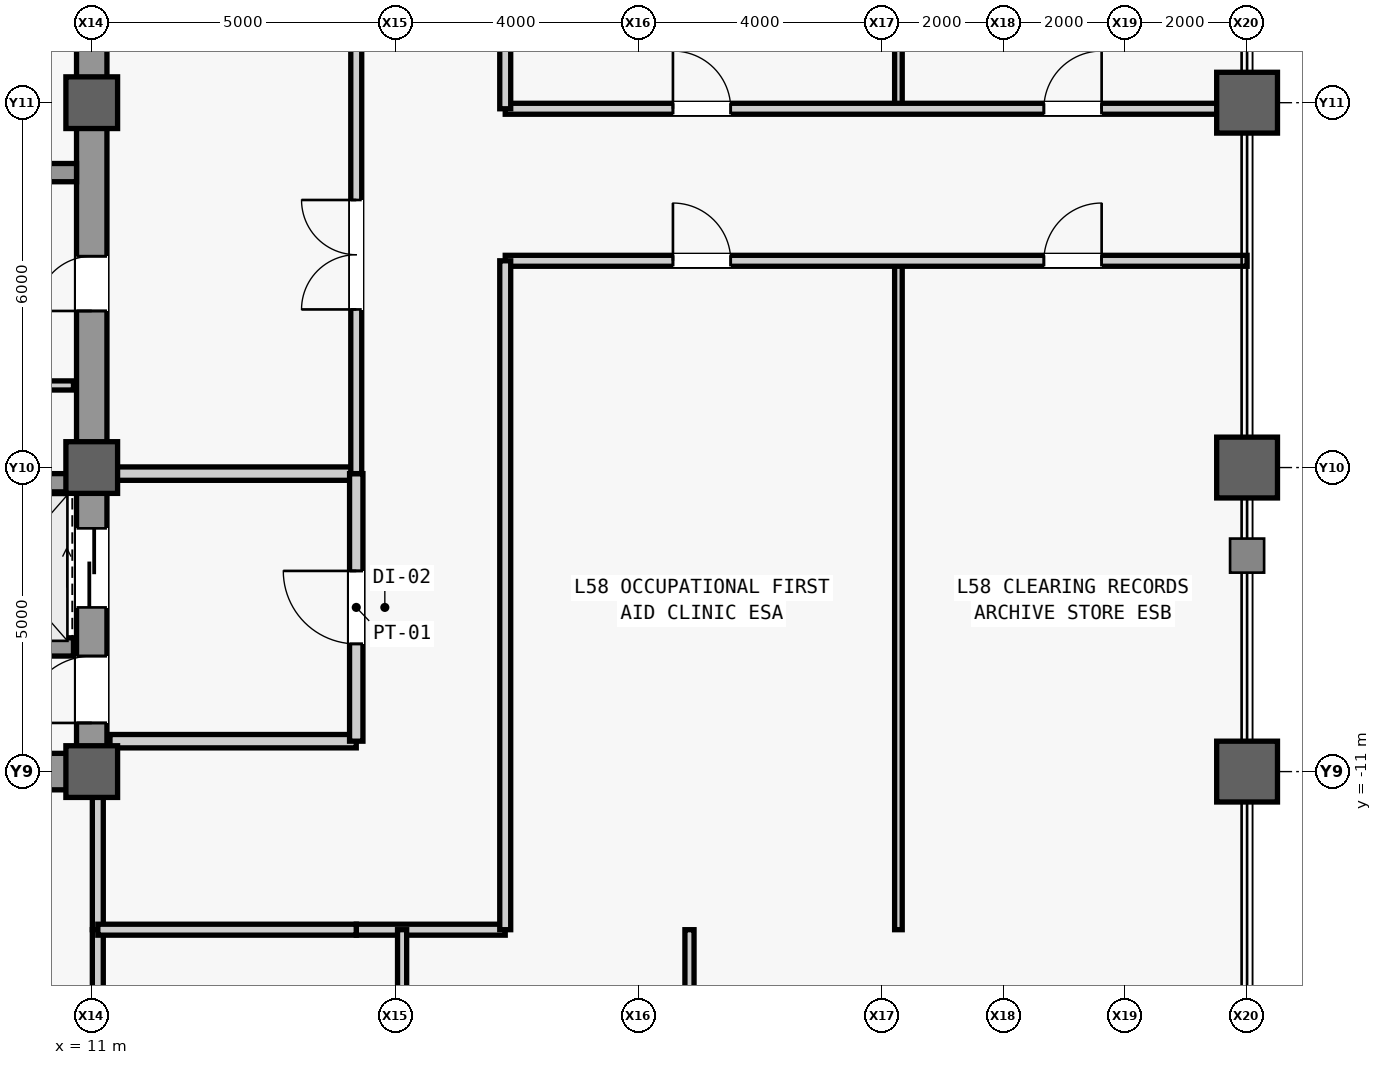
"""IFC4 building model, lengths in metres.
Left out: names, types, materials, properties, quantities, classifications, styles, units other than length and angle.
Written with IfcOpenShell. Run it as: python <this file> out.ifc"""

import sys

from ifc_helpers import new_model, si_unit, direction, frame, frame_2d, origin, origin_2d, place, context, subcontext, project, spatial, rectangle, hollow_rectangle, extrude, source, transform, mapped, element, fill, save


model = new_model("IFC4")
c1 = context("Model", 3, precision=1e-05, world=origin(), true_north=direction((0.0, 1.0)))
c2 = subcontext(c1, "Body", "Model", "MODEL_VIEW")
j1 = project(units=[si_unit("LENGTHUNIT", "METRE"), si_unit("PLANEANGLEUNIT", "RADIAN")], contexts=[c1])
p1 = place(None, origin())
s1 = spatial("IfcSite", under=j1, at=p1, CompositionType="ELEMENT")
p2 = place(p1, origin())
s2 = spatial("IfcBuilding", under=s1, at=p2, CompositionType="ELEMENT")
p3 = place(p2, frame((0.0, 0.0, 247.1)))
s3 = spatial("IfcBuildingStorey", under=s2, at=p3, CompositionType="ELEMENT", Elevation=247.1)
m1 = source(origin(), c2, "Body", "SweptSolid", [
    extrude(rectangle(XDim=22.0, YDim=0.5, at=frame_2d((11.0, 0.0))), origin(), (0.0, 0.0, 1.0), 3.78),
])
p4 = place(p3, frame((11.0, -11.0, 0.0), z_axis=(0.0, 0.0, 1.0), x_axis=(0.0, 1.0, 0.0)))
e1 = element("IfcWall", 1, at=p4, inside=s3, PredefinedType="SHEAR", context=c2, shape_type="MappedRepresentation", body=[
    mapped(m1, transform((0.0, 0.0, 0.0), scale=1.0)),
])
m2 = source(origin(), c2, "Body", "SweptSolid", [
    extrude(rectangle(XDim=1.1, YDim=2.2, at=frame_2d((0.55, 1.1))), frame((0.0, 0.26, 0.0), z_axis=(0.0, -1.0, 0.0), x_axis=(1.0, 0.0, 0.0)), (0.0, 0.0, 1.0), 0.52),
])
p5 = place(p4, frame((0.8, 0.0, 0.0)))
e2 = element("IfcOpeningElement", 2, at=p5, cuts=e1, PredefinedType="OPENING", context=c2, shape_type="MappedRepresentation", body=[
    mapped(m2, transform((0.0, 0.0, 0.0), scale=1.0)),
])
m3 = source(origin(), c2, "Body", "SweptSolid", [
    extrude(rectangle(XDim=0.9, YDim=2.15, at=frame_2d((0.45, 1.075))), frame((0.0, 0.26, 0.0), z_axis=(0.0, -1.0, 0.0), x_axis=(1.0, 0.0, 0.0)), (0.0, 0.0, 1.0), 0.52),
])
p6 = place(p4, frame((7.575, 0.0, 0.0)))
e3 = element("IfcOpeningElement", 3, at=p6, cuts=e1, PredefinedType="OPENING", context=c2, shape_type="MappedRepresentation", body=[
    mapped(m3, transform((0.0, 0.0, 0.0), scale=1.0)),
])
m4 = source(origin(), c2, "Body", "SweptSolid", [
    extrude(rectangle(XDim=1.3, YDim=2.3, at=frame_2d((0.65, 1.15))), frame((0.0, 0.26, 0.0), z_axis=(0.0, -1.0, 0.0), x_axis=(1.0, 0.0, 0.0)), (0.0, 0.0, 1.0), 0.52),
])
p7 = place(p4, frame((2.7, 0.0, 0.0)))
e4 = element("IfcOpeningElement", 4, at=p7, cuts=e1, PredefinedType="OPENING", context=c2, shape_type="MappedRepresentation", body=[
    mapped(m4, transform((0.0, 0.0, 0.0), scale=1.0)),
])
p8 = place(p4, frame((13.35, 0.0, 0.0)))
e5 = element("IfcOpeningElement", 5, at=p8, cuts=e1, PredefinedType="OPENING", context=c2, shape_type="MappedRepresentation", body=[
    mapped(m4, transform((0.0, 0.0, 0.0), scale=1.0)),
])
m5 = source(origin(), c2, "Body", "SweptSolid", [
    extrude(rectangle(XDim=5.9, YDim=0.6, at=frame_2d((2.95, 0.0))), origin(), (0.0, 0.0, 1.0), 3.78),
])
p9 = place(p3, frame((4.85, -11.0, 0.0), z_axis=(0.0, 0.0, 1.0), x_axis=(1.0, 0.0, 0.0)))
e6 = element("IfcWall", 6, at=p9, inside=s3, PredefinedType="SHEAR", context=c2, shape_type="MappedRepresentation", body=[
    mapped(m5, transform((0.0, 0.0, 0.0), scale=1.0)),
])
m6 = source(origin(), c2, "Body", "SweptSolid", [
    extrude(rectangle(XDim=5.65, YDim=0.3, at=frame_2d((2.825, 0.0))), origin(), (0.0, 0.0, 1.0), 3.78),
])
p10 = place(p3, frame((5.1, -1.15, 0.0), z_axis=(0.0, 0.0, 1.0), x_axis=(1.0, 0.0, 0.0)))
e7 = element("IfcWall", 7, at=p10, inside=s3, PredefinedType="SHEAR", context=c2, shape_type="MappedRepresentation", body=[
    mapped(m6, transform((0.0, 0.0, 0.0), scale=1.0)),
])
m7 = source(origin(), c2, "Body", "SweptSolid", [
    extrude(rectangle(XDim=0.85, YDim=0.85, at=origin_2d()), origin(), (0.0, 0.0, 1.0), 4.0),
])
for number, where, z_axis, x_axis in (
    (8, (11.0, -11.0, 0.0), (0.0, 0.0, 1.0), (1.0, 0.0, 0.0)),
    (9, (11.0, -6.0, 0.0), (0.0, 0.0, 1.0), (1.0, 0.0, 0.0)),
    (10, (11.0, 0.0, 0.0), (0.0, 0.0, 1.0), (1.0, 0.0, 0.0)),
):
    element("IfcColumn", number, at=place(p3, frame(where, z_axis=z_axis, x_axis=x_axis)), inside=s3, PredefinedType="COLUMN", context=c2, shape_type="MappedRepresentation", body=[
        mapped(m7, transform((0.0, 0.0, 0.0), scale=1.0)),
    ])
m8 = source(origin(), c2, "Body", "SweptSolid", [
    extrude(hollow_rectangle(XDim=1.0, YDim=1.0, WallThickness=0.055, at=origin_2d()), origin(), (0.0, 0.0, 1.0), 4.0),
])
for number, where, z_axis, x_axis in (
    (11, (30.0, -11.0, 0.0), (0.0, 0.0, 1.0), (1.0, 0.0, 0.0)),
    (12, (30.0, -6.0, 0.0), (0.0, 0.0, 1.0), (1.0, 0.0, 0.0)),
    (13, (30.0, 0.0, 0.0), (0.0, 0.0, 1.0), (1.0, 0.0, 0.0)),
):
    element("IfcColumn", number, at=place(p3, frame(where, z_axis=z_axis, x_axis=x_axis)), inside=s3, PredefinedType="COLUMN", context=c2, shape_type="MappedRepresentation", body=[
        mapped(m8, transform((0.0, 0.0, 0.0), scale=1.0)),
    ])
m9 = source(origin(), c2, "Body", "SweptSolid", [
    extrude(rectangle(XDim=2.2, YDim=0.3, at=frame_2d((1.1, 0.0))), origin(), (0.0, 0.0, 1.0), 3.78),
])
for number, where, z_axis, x_axis in (
    (14, (8.5, -8.95, 0.0), (0.0, 0.0, 1.0), (1.0, 0.0, 0.0)),
    (15, (8.5, -6.25, 0.0), (0.0, 0.0, 1.0), (1.0, 0.0, 0.0)),
):
    element("IfcWall", number, at=place(p3, frame(where, z_axis=z_axis, x_axis=x_axis)), inside=s3, PredefinedType="SHEAR", context=c2, shape_type="MappedRepresentation", body=[
        mapped(m9, transform((0.0, 0.0, 0.0), scale=1.0)),
    ])
m10 = source(origin(), c2, "Body", "SweptSolid", [
    extrude(rectangle(XDim=2.05, YDim=0.15, at=frame_2d((1.025, 0.0))), origin(), (0.0, 0.0, 1.0), 3.78),
])
p11 = place(p3, frame((8.65, -4.65, 0.0), z_axis=(0.0, 0.0, 1.0), x_axis=(1.0, 0.0, 0.0)))
e16 = element("IfcWall", 16, at=p11, inside=s3, PredefinedType="PARTITIONING", context=c2, shape_type="MappedRepresentation", body=[
    mapped(m10, transform((0.0, 0.0, 0.0), scale=1.0)),
])
m11 = source(origin(), c2, "Body", "SweptSolid", [
    extrude(rectangle(XDim=4.05, YDim=0.22, at=frame_2d((2.025, 0.0))), origin(), (0.0, 0.0, 1.0), 3.78),
])
p12 = place(p3, frame((11.3, -10.5, 0.0), z_axis=(0.0, 0.0, 1.0), x_axis=(1.0, 0.0, 0.0)))
e17 = element("IfcWall", 17, at=p12, inside=s3, PredefinedType="PARTITIONING", context=c2, shape_type="MappedRepresentation", body=[
    mapped(m11, transform((0.0, 0.0, 0.0), scale=1.0)),
])
m12 = source(origin(), c2, "Body", "SweptSolid", [
    extrude(rectangle(XDim=4.05, YDim=0.22, at=frame_2d((2.025, 0.0))), origin(), (0.0, 0.0, 1.0), 3.085),
])
p13 = place(p3, frame((11.3, -6.1, 0.0), z_axis=(0.0, 0.0, 1.0), x_axis=(1.0, 0.0, 0.0)))
e18 = element("IfcWall", 18, at=p13, inside=s3, PredefinedType="PARTITIONING", context=c2, shape_type="MappedRepresentation", body=[
    mapped(m12, transform((0.0, 0.0, 0.0), scale=1.0)),
])
m13 = source(origin(), c2, "Body", "SweptSolid", [
    extrude(rectangle(XDim=4.4, YDim=0.22, at=frame_2d((2.2, 0.0))), origin(), (0.0, 0.0, 1.0), 3.78),
])
p14 = place(p3, frame((15.35, -10.5, 0.0), z_axis=(0.0, 0.0, 1.0), x_axis=(0.0, 1.0, 0.0)))
e19 = element("IfcWall", 19, at=p14, inside=s3, PredefinedType="PARTITIONING", context=c2, shape_type="MappedRepresentation", body=[
    mapped(m13, transform((0.0, 0.0, 0.0), scale=1.0)),
])
m14 = source(origin(), c2, "Body", "SweptSolid", [
    extrude(rectangle(XDim=1.2, YDim=2.2, at=frame_2d((0.6, 1.1))), frame((0.0, 0.12, 0.0), z_axis=(0.0, -1.0, 0.0), x_axis=(1.0, 0.0, 0.0)), (0.0, 0.0, 1.0), 0.24),
])
p15 = place(p14, frame((1.6, 0.0, 0.0)))
e20 = element("IfcOpeningElement", 20, at=p15, cuts=e19, PredefinedType="OPENING", context=c2, shape_type="MappedRepresentation", body=[
    mapped(m14, transform((0.0, 0.0, 0.0), scale=1.0)),
])
m15 = source(origin(), c2, "Body", "SweptSolid", [
    extrude(rectangle(XDim=16.6, YDim=0.18, at=frame_2d((8.3, 0.0))), origin(), (0.0, 0.0, 1.0), 3.78),
])
p16 = place(p3, frame((15.35, -6.1, 0.0), z_axis=(0.0, 0.0, 1.0), x_axis=(0.0, 1.0, 0.0)))
e21 = element("IfcWall", 21, at=p16, inside=s3, PredefinedType="PARTITIONING", context=c2, shape_type="MappedRepresentation", body=[
    mapped(m15, transform((0.0, 0.0, 0.0), scale=1.0)),
])
m16 = source(origin(), c2, "Body", "SweptSolid", [
    extrude(rectangle(XDim=1.8, YDim=2.25, at=frame_2d((0.9, 1.125))), frame((0.0, 0.1, 0.0), z_axis=(0.0, -1.0, 0.0), x_axis=(1.0, 0.0, 0.0)), (0.0, 0.0, 1.0), 0.2),
])
p17 = place(p16, frame((2.7, 0.0, 0.0)))
e22 = element("IfcOpeningElement", 22, at=p17, cuts=e21, PredefinedType="OPENING", context=c2, shape_type="MappedRepresentation", body=[
    mapped(m16, transform((0.0, 0.0, 0.0), scale=1.0)),
])
p18 = place(p16, frame((13.0, 0.0, 0.0)))
e23 = element("IfcOpeningElement", 23, at=p18, cuts=e21, PredefinedType="OPENING", context=c2, shape_type="MappedRepresentation", body=[
    mapped(m16, transform((0.0, 0.0, 0.0), scale=1.0)),
])
m17 = source(origin(), c2, "Body", "SweptSolid", [
    extrude(rectangle(XDim=2.45, YDim=0.18, at=frame_2d((1.225, 0.0))), origin(), (0.0, 0.0, 1.0), 3.78),
])
p19 = place(p3, frame((15.35, -13.6, 0.0), z_axis=(0.0, 0.0, 1.0), x_axis=(1.0, 0.0, 0.0)))
e24 = element("IfcWall", 24, at=p19, inside=s3, PredefinedType="PARTITIONING", context=c2, shape_type="MappedRepresentation", body=[
    mapped(m17, transform((0.0, 0.0, 0.0), scale=1.0)),
])
m18 = source(origin(), c2, "Body", "SweptSolid", [
    extrude(rectangle(XDim=2.6, YDim=0.18, at=frame_2d((1.3, 0.0))), origin(), (0.0, 0.0, 1.0), 3.085),
])
p20 = place(p3, frame((11.1, -13.6, 0.0), z_axis=(0.0, 0.0, 1.0), x_axis=(0.0, 1.0, 0.0)))
e25 = element("IfcWall", 25, at=p20, inside=s3, PredefinedType="PARTITIONING", context=c2, shape_type="MappedRepresentation", body=[
    mapped(m18, transform((0.0, 0.0, 0.0), scale=1.0)),
])
m19 = source(origin(), c2, "Body", "SweptSolid", [
    extrude(rectangle(XDim=16.4, YDim=0.15, at=frame_2d((8.2, 0.0))), origin(), (0.0, 0.0, 1.0), 3.78),
])
p21 = place(p3, frame((16.104, -30.0, 0.0), z_axis=(0.0, 0.0, 1.0), x_axis=(0.0, 1.0, 0.0)))
e26 = element("IfcWall", 26, at=p21, inside=s3, PredefinedType="PARTITIONING", context=c2, shape_type="MappedRepresentation", body=[
    mapped(m19, transform((0.0, 0.0, 0.0), scale=1.0)),
])
m20 = source(origin(), c2, "Body", "SweptSolid", [
    extrude(rectangle(XDim=0.95, YDim=2.15, at=frame_2d((0.475, 1.075))), frame((0.0, 0.085, 0.0), z_axis=(0.0, -1.0, 0.0), x_axis=(1.0, 0.0, 0.0)), (0.0, 0.0, 1.0), 0.17),
])
p22 = place(p21, frame((11.825, 0.0, 0.0)))
e27 = element("IfcOpeningElement", 27, at=p22, cuts=e26, PredefinedType="OPENING", context=c2, shape_type="MappedRepresentation", body=[
    mapped(m20, transform((0.0, 0.0, 0.0), scale=1.0)),
])
p23 = place(p3, frame((20.83, -30.0, 0.0), z_axis=(0.0, 0.0, 1.0), x_axis=(0.0, 1.0, 0.0)))
e28 = element("IfcWall", 28, at=p23, inside=s3, PredefinedType="PARTITIONING", context=c2, shape_type="MappedRepresentation", body=[
    mapped(m19, transform((0.0, 0.0, 0.0), scale=1.0)),
])
p24 = place(p23, frame((11.825, 0.0, 0.0)))
e29 = element("IfcOpeningElement", 29, at=p24, cuts=e28, PredefinedType="OPENING", context=c2, shape_type="MappedRepresentation", body=[
    mapped(m20, transform((0.0, 0.0, 0.0), scale=1.0)),
])
m21 = source(origin(), c2, "Body", "SweptSolid", [
    extrude(rectangle(XDim=16.4, YDim=0.18, at=frame_2d((8.2, 0.0))), origin(), (0.0, 0.0, 1.0), 3.085),
])
p25 = place(p3, frame((11.1, -30.0, 0.0), z_axis=(0.0, 0.0, 1.0), x_axis=(0.0, 1.0, 0.0)))
e30 = element("IfcWall", 30, at=p25, inside=s3, PredefinedType="PARTITIONING", context=c2, shape_type="MappedRepresentation", body=[
    mapped(m21, transform((0.0, 0.0, 0.0), scale=1.0)),
])
m22 = source(origin(), c2, "Body", "SweptSolid", [
    extrude(rectangle(XDim=1.05, YDim=2.2, at=frame_2d((0.525, 1.1))), frame((0.0, 0.1, 0.0), z_axis=(0.0, -1.0, 0.0), x_axis=(1.0, 0.0, 0.0)), (0.0, 0.0, 1.0), 0.2),
])
p26 = place(p25, frame((3.575, 0.0, 0.0)))
e31 = element("IfcOpeningElement", 31, at=p26, cuts=e30, PredefinedType="OPENING", context=c2, shape_type="MappedRepresentation", body=[
    mapped(m22, transform((0.0, 0.0, 0.0), scale=1.0)),
])
m23 = source(origin(), c2, "Body", "SweptSolid", [
    extrude(rectangle(XDim=4.25, YDim=0.18, at=frame_2d((2.125, 0.0))), origin(), (0.0, 0.0, 1.0), 3.78),
])
p27 = place(p3, frame((11.1, -13.6, 0.0), z_axis=(0.0, 0.0, 1.0), x_axis=(1.0, 0.0, 0.0)))
e32 = element("IfcWall", 32, at=p27, inside=s3, PredefinedType="PARTITIONING", context=c2, shape_type="MappedRepresentation", body=[
    mapped(m23, transform((0.0, 0.0, 0.0), scale=1.0)),
])
m24 = source(origin(), c2, "Body", "SweptSolid", [
    extrude(rectangle(XDim=11.0, YDim=0.125, at=frame_2d((5.5, 0.0))), origin(), (0.0, 0.0, 1.0), 3.78),
])
p28 = place(p3, frame((24.266, -13.6, 0.0), z_axis=(0.0, 0.0, 1.0), x_axis=(0.0, 1.0, 0.0)))
e33 = element("IfcWall", 33, at=p28, inside=s3, PredefinedType="PARTITIONING", context=c2, shape_type="MappedRepresentation", body=[
    mapped(m24, transform((0.0, 0.0, 0.0), scale=1.0)),
])
m25 = source(origin(), c2, "Body", "SweptSolid", [
    extrude(rectangle(XDim=12.2, YDim=0.18, at=frame_2d((6.1, 0.0))), origin(), (0.0, 0.0, 1.0), 3.78),
])
p29 = place(p3, frame((17.8, -2.6, 0.0), z_axis=(0.0, 0.0, 1.0), x_axis=(1.0, 0.0, 0.0)))
e34 = element("IfcWall", 34, at=p29, inside=s3, PredefinedType="PARTITIONING", context=c2, shape_type="MappedRepresentation", body=[
    mapped(m25, transform((0.0, 0.0, 0.0), scale=1.0)),
])
m26 = source(origin(), c2, "Body", "SweptSolid", [
    extrude(rectangle(XDim=0.95, YDim=2.15, at=frame_2d((0.475, 1.075))), frame((0.0, 0.1, 0.0), z_axis=(0.0, -1.0, 0.0), x_axis=(1.0, 0.0, 0.0)), (0.0, 0.0, 1.0), 0.2),
])
p30 = place(p29, frame((2.758, 0.0, 0.0)))
e35 = element("IfcOpeningElement", 35, at=p30, cuts=e34, PredefinedType="OPENING", context=c2, shape_type="MappedRepresentation", body=[
    mapped(m26, transform((0.0, 0.0, 0.0), scale=1.0)),
])
p31 = place(p29, frame((8.858, 0.0, 0.0)))
e36 = element("IfcOpeningElement", 36, at=p31, cuts=e34, PredefinedType="OPENING", context=c2, shape_type="MappedRepresentation", body=[
    mapped(m26, transform((0.0, 0.0, 0.0), scale=1.0)),
])
m27 = source(origin(), c2, "Body", "SweptSolid", [
    extrude(rectangle(XDim=11.0, YDim=0.18, at=frame_2d((5.5, 0.0))), origin(), (0.0, 0.0, 1.0), 3.78),
])
p32 = place(p3, frame((17.8, -13.6, 0.0), z_axis=(0.0, 0.0, 1.0), x_axis=(0.0, 1.0, 0.0)))
e37 = element("IfcWall", 37, at=p32, inside=s3, PredefinedType="PARTITIONING", context=c2, shape_type="MappedRepresentation", body=[
    mapped(m27, transform((0.0, 0.0, 0.0), scale=1.0)),
])
m28 = source(origin(), c2, "Body", "SweptSolid", [
    extrude(rectangle(XDim=14.2, YDim=0.125, at=frame_2d((7.1, 0.0))), origin(), (0.0, 0.0, 1.0), 3.78),
])
p33 = place(p3, frame((24.266, -0.1, 0.0), z_axis=(0.0, 0.0, 1.0), x_axis=(0.0, 1.0, 0.0)))
e38 = element("IfcWall", 38, at=p33, inside=s3, PredefinedType="PARTITIONING", context=c2, shape_type="MappedRepresentation", body=[
    mapped(m28, transform((0.0, 0.0, 0.0), scale=1.0)),
])
m29 = source(origin(), c2, "Body", "SweptSolid", [
    extrude(rectangle(XDim=12.2, YDim=0.18, at=frame_2d((6.1, 0.0))), origin(), (0.0, 0.0, 1.0), 3.085),
])
p34 = place(p3, frame((17.8, -0.1, 0.0), z_axis=(0.0, 0.0, 1.0), x_axis=(1.0, 0.0, 0.0)))
e39 = element("IfcWall", 39, at=p34, inside=s3, PredefinedType="PARTITIONING", context=c2, shape_type="MappedRepresentation", body=[
    mapped(m29, transform((0.0, 0.0, 0.0), scale=1.0)),
])
p35 = place(p34, frame((2.758, 0.0, 0.0)))
e40 = element("IfcOpeningElement", 40, at=p35, cuts=e39, PredefinedType="OPENING", context=c2, shape_type="MappedRepresentation", body=[
    mapped(m26, transform((0.0, 0.0, 0.0), scale=1.0)),
])
p36 = place(p34, frame((8.858, 0.0, 0.0)))
e41 = element("IfcOpeningElement", 41, at=p36, cuts=e39, PredefinedType="OPENING", context=c2, shape_type="MappedRepresentation", body=[
    mapped(m26, transform((0.0, 0.0, 0.0), scale=1.0)),
])
m30 = source(origin(), c2, "Body", "SweptSolid", [
    extrude(rectangle(XDim=14.2, YDim=0.18, at=frame_2d((7.1, 0.0))), origin(), (0.0, 0.0, 1.0), 3.78),
])
p37 = place(p3, frame((17.8, -0.1, 0.0), z_axis=(0.0, 0.0, 1.0), x_axis=(0.0, 1.0, 0.0)))
e42 = element("IfcWall", 42, at=p37, inside=s3, PredefinedType="PARTITIONING", context=c2, shape_type="MappedRepresentation", body=[
    mapped(m30, transform((0.0, 0.0, 0.0), scale=1.0)),
])
m31 = source(origin(), c2, "Body", "SweptSolid", [
    extrude(rectangle(XDim=1.1, YDim=2.2, at=frame_2d((0.55, 1.1))), frame((0.0, 0.025, 0.0), z_axis=(0.0, -1.0, 0.0), x_axis=(1.0, 0.0, 0.0)), (0.0, 0.0, 1.0), 0.05),
])
p38 = place(p5, origin())
e43 = element("IfcDoor", 43, at=p38, inside=s3, OperationType="SINGLE_SWING_LEFT", PredefinedType="DOOR", context=c2, shape_type="MappedRepresentation", body=[
    mapped(m31, transform((0.0, 0.0, 0.0), scale=1.0)),
])
fill(e2, e43)
m32 = source(origin(), c2, "Body", "SweptSolid", [
    extrude(rectangle(XDim=0.9, YDim=2.15, at=frame_2d((0.45, 1.075))), frame((0.0, 0.025, 0.0), z_axis=(0.0, -1.0, 0.0), x_axis=(1.0, 0.0, 0.0)), (0.0, 0.0, 1.0), 0.05),
])
p39 = place(p6, origin())
e44 = element("IfcDoor", 44, at=p39, inside=s3, OperationType="SINGLE_SWING_LEFT", PredefinedType="DOOR", context=c2, shape_type="MappedRepresentation", body=[
    mapped(m32, transform((0.0, 0.0, 0.0), scale=1.0)),
])
fill(e3, e44)
m33 = source(origin(), c2, "Body", "SweptSolid", [
    extrude(rectangle(XDim=1.2, YDim=2.2, at=frame_2d((0.6, 1.1))), frame((0.0, 0.025, 0.0), z_axis=(0.0, -1.0, 0.0), x_axis=(1.0, 0.0, 0.0)), (0.0, 0.0, 1.0), 0.05),
])
p40 = place(p15, origin())
e45 = element("IfcDoor", 45, at=p40, inside=s3, OperationType="SINGLE_SWING_RIGHT", PredefinedType="DOOR", context=c2, shape_type="MappedRepresentation", body=[
    mapped(m33, transform((0.0, 0.0, 0.0), scale=1.0)),
])
fill(e20, e45)
m34 = source(origin(), c2, "Body", "SweptSolid", [
    extrude(rectangle(XDim=1.8, YDim=2.25, at=frame_2d((0.9, 1.125))), frame((0.0, 0.025, 0.0), z_axis=(0.0, -1.0, 0.0), x_axis=(1.0, 0.0, 0.0)), (0.0, 0.0, 1.0), 0.05),
])
p41 = place(p17, origin())
e46 = element("IfcDoor", 46, at=p41, inside=s3, OperationType="SINGLE_SWING_RIGHT", PredefinedType="DOOR", context=c2, shape_type="MappedRepresentation", body=[
    mapped(m34, transform((0.0, 0.0, 0.0), scale=1.0)),
])
fill(e22, e46)
m35 = source(origin(), c2, "Body", "SweptSolid", [
    extrude(rectangle(XDim=0.95, YDim=2.15, at=frame_2d((0.475, 1.075))), frame((0.0, 0.025, 0.0), z_axis=(0.0, -1.0, 0.0), x_axis=(1.0, 0.0, 0.0)), (0.0, 0.0, 1.0), 0.05),
])
p42 = place(p30, origin())
e47 = element("IfcDoor", 47, at=p42, inside=s3, OperationType="SINGLE_SWING_LEFT", PredefinedType="DOOR", context=c2, shape_type="MappedRepresentation", body=[
    mapped(m35, transform((0.0, 0.0, 0.0), scale=1.0)),
])
fill(e35, e47)
p43 = place(p31, origin())
e48 = element("IfcDoor", 48, at=p43, inside=s3, OperationType="SINGLE_SWING_RIGHT", PredefinedType="DOOR", context=c2, shape_type="MappedRepresentation", body=[
    mapped(m35, transform((0.0, 0.0, 0.0), scale=1.0)),
])
fill(e36, e48)
p44 = place(p35, origin())
e49 = element("IfcDoor", 49, at=p44, inside=s3, OperationType="SINGLE_SWING_LEFT", PredefinedType="DOOR", context=c2, shape_type="MappedRepresentation", body=[
    mapped(m35, transform((0.0, 0.0, 0.0), scale=1.0)),
])
fill(e40, e49)
p45 = place(p36, origin())
e50 = element("IfcDoor", 50, at=p45, inside=s3, OperationType="SINGLE_SWING_RIGHT", PredefinedType="DOOR", context=c2, shape_type="MappedRepresentation", body=[
    mapped(m35, transform((0.0, 0.0, 0.0), scale=1.0)),
])
fill(e41, e50)
m36 = source(origin(), c2, "Body", "SweptSolid", [
    extrude(rectangle(XDim=1.3, YDim=2.3, at=frame_2d((0.65, 1.15))), frame((0.0, 0.025, 0.0), z_axis=(0.0, -1.0, 0.0), x_axis=(1.0, 0.0, 0.0)), (0.0, 0.0, 1.0), 0.05),
])
p46 = place(p7, origin())
e51 = element("IfcDoor", 51, at=p46, inside=s3, OperationType="SLIDING_TO_LEFT", PredefinedType="DOOR", context=c2, shape_type="MappedRepresentation", body=[
    mapped(m36, transform((0.0, 0.0, 0.0), scale=1.0)),
])
fill(e4, e51)
save(model, sys.argv[1])
